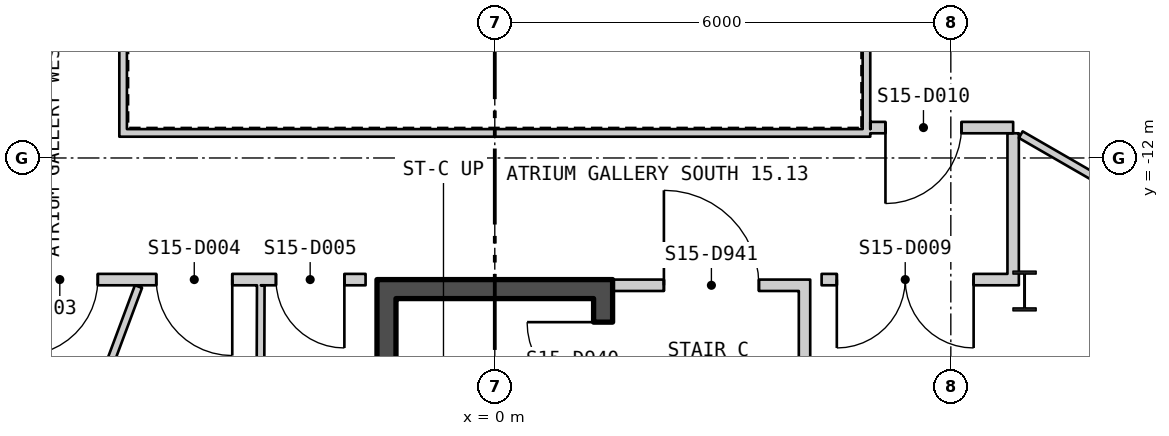
"""IFC4 building model, lengths in metres.
Left out: names, types, materials, properties, quantities, classifications, styles, units other than length and angle.
Written with IfcOpenShell. Run it as: python <this file> out.ifc"""

import sys

from ifc_helpers import new_model, si_unit, direction, frame, frame_2d, origin, origin_2d, place, context, subcontext, project, spatial, polyline, rectangle, i_section, outline, extrude, element, fill, save


model = new_model("IFC4")
c1 = context("Model", 3, precision=1e-05, world=origin(), true_north=direction((0.0, 1.0)))
c2 = subcontext(c1, "Body", "Model", "MODEL_VIEW")
j1 = project(units=[si_unit("LENGTHUNIT", "METRE"), si_unit("PLANEANGLEUNIT", "RADIAN")], contexts=[c1])
p1 = place(None, origin())
s1 = spatial("IfcSite", under=j1, at=p1, CompositionType="ELEMENT")
p2 = place(p1, origin())
s2 = spatial("IfcBuilding", under=s1, at=p2, CompositionType="ELEMENT")
p3 = place(p2, frame((0.0, 0.0, 204.3)))
s3 = spatial("IfcBuildingStorey", under=s2, at=p3, CompositionType="ELEMENT", Elevation=204.3)
p4 = place(p3, frame((6.97, -13.75, 0.0), z_axis=(0.0, 0.0, 1.0), x_axis=(1.0, 0.0, 0.0)))
e1 = element("IfcColumn", 1, at=p4, inside=s3, PredefinedType="COLUMN", context=c2, shape_type="SweptSolid", body=[
    extrude(i_section(OverallWidth=0.306, OverallDepth=0.524, WebThickness=0.021, FlangeThickness=0.04, at=origin_2d()), origin(), (0.0, 0.0, 1.0), 3.9),
])
p5 = place(p3, frame((-26.385, 13.887, -0.18), z_axis=(0.0, 0.0, 1.0), x_axis=(0.499999764979, -0.866025539474, 0.0)))
e2 = element("IfcWall", 2, at=p5, inside=s3, PredefinedType="SOLIDWALL", context=c2, shape_type="SweptSolid", body=[
    extrude(outline(polyline([(-0.13, -0.225), (45.87, -0.225), (45.61, 0.225), (0.13, 0.225), (-0.13, -0.225)])), origin(), (0.0, 0.0, 1.0), 3.68),
])
p6 = place(p5, frame((1.424, 0.0, 1.08)))
e3 = element("IfcOpeningElement", 3, at=p6, cuts=e2, PredefinedType="OPENING", context=c2, shape_type="SweptSolid", body=[
    extrude(rectangle(XDim=2.4, YDim=2.0, at=frame_2d((1.2, 1.0))), frame((0.0, 0.235, 0.0), z_axis=(0.0, -1.0, 0.0), x_axis=(1.0, 0.0, 0.0)), (0.0, 0.0, 1.0), 0.47),
])
p7 = place(p5, frame((5.893, 0.0, 1.08)))
e4 = element("IfcOpeningElement", 4, at=p7, cuts=e2, PredefinedType="OPENING", context=c2, shape_type="SweptSolid", body=[
    extrude(rectangle(XDim=2.4, YDim=2.0, at=frame_2d((1.2, 1.0))), frame((0.0, 0.235, 0.0), z_axis=(0.0, -1.0, 0.0), x_axis=(1.0, 0.0, 0.0)), (0.0, 0.0, 1.0), 0.47),
])
p8 = place(p5, frame((10.401, 0.0, 1.08)))
e5 = element("IfcOpeningElement", 5, at=p8, cuts=e2, PredefinedType="OPENING", context=c2, shape_type="SweptSolid", body=[
    extrude(rectangle(XDim=2.4, YDim=2.0, at=frame_2d((1.2, 1.0))), frame((0.0, 0.235, 0.0), z_axis=(0.0, -1.0, 0.0), x_axis=(1.0, 0.0, 0.0)), (0.0, 0.0, 1.0), 0.47),
])
p9 = place(p5, frame((14.909, 0.0, 1.08)))
e6 = element("IfcOpeningElement", 6, at=p9, cuts=e2, PredefinedType="OPENING", context=c2, shape_type="SweptSolid", body=[
    extrude(rectangle(XDim=2.4, YDim=2.0, at=frame_2d((1.2, 1.0))), frame((0.0, 0.235, 0.0), z_axis=(0.0, -1.0, 0.0), x_axis=(1.0, 0.0, 0.0)), (0.0, 0.0, 1.0), 0.47),
])
p10 = place(p5, frame((19.416, 0.0, 1.08)))
e7 = element("IfcOpeningElement", 7, at=p10, cuts=e2, PredefinedType="OPENING", context=c2, shape_type="SweptSolid", body=[
    extrude(rectangle(XDim=2.4, YDim=2.0, at=frame_2d((1.2, 1.0))), frame((0.0, 0.235, 0.0), z_axis=(0.0, -1.0, 0.0), x_axis=(1.0, 0.0, 0.0)), (0.0, 0.0, 1.0), 0.47),
])
p11 = place(p5, frame((23.924, 0.0, 1.08)))
e8 = element("IfcOpeningElement", 8, at=p11, cuts=e2, PredefinedType="OPENING", context=c2, shape_type="SweptSolid", body=[
    extrude(rectangle(XDim=2.4, YDim=2.0, at=frame_2d((1.2, 1.0))), frame((0.0, 0.235, 0.0), z_axis=(0.0, -1.0, 0.0), x_axis=(1.0, 0.0, 0.0)), (0.0, 0.0, 1.0), 0.47),
])
p12 = place(p5, frame((28.431, 0.0, 1.08)))
e9 = element("IfcOpeningElement", 9, at=p12, cuts=e2, PredefinedType="OPENING", context=c2, shape_type="SweptSolid", body=[
    extrude(rectangle(XDim=2.4, YDim=2.0, at=frame_2d((1.2, 1.0))), frame((0.0, 0.235, 0.0), z_axis=(0.0, -1.0, 0.0), x_axis=(1.0, 0.0, 0.0)), (0.0, 0.0, 1.0), 0.47),
])
p13 = place(p5, frame((32.939, 0.0, 1.08)))
e10 = element("IfcOpeningElement", 10, at=p13, cuts=e2, PredefinedType="OPENING", context=c2, shape_type="SweptSolid", body=[
    extrude(rectangle(XDim=2.4, YDim=2.0, at=frame_2d((1.2, 1.0))), frame((0.0, 0.235, 0.0), z_axis=(0.0, -1.0, 0.0), x_axis=(1.0, 0.0, 0.0)), (0.0, 0.0, 1.0), 0.47),
])
p14 = place(p5, frame((41.916, 0.0, 1.08)))
e11 = element("IfcOpeningElement", 11, at=p14, cuts=e2, PredefinedType="OPENING", context=c2, shape_type="SweptSolid", body=[
    extrude(rectangle(XDim=2.4, YDim=2.0, at=frame_2d((1.2, 1.0))), frame((0.0, 0.235, 0.0), z_axis=(0.0, -1.0, 0.0), x_axis=(1.0, 0.0, 0.0)), (0.0, 0.0, 1.0), 0.47),
])
p15 = place(p3, frame((3.515, -25.726, -0.18), z_axis=(0.0, 0.0, 1.0), x_axis=(0.499999764979, 0.866025539474, 0.0)))
e12 = element("IfcWall", 12, at=p15, inside=s3, PredefinedType="SOLIDWALL", context=c2, shape_type="SweptSolid", body=[
    extrude(outline(polyline([(-0.13, -0.225), (45.87, -0.225), (45.61, 0.225), (0.13, 0.225), (-0.13, -0.225)])), origin(), (0.0, 0.0, 1.0), 3.68),
])
p16 = place(p15, frame((1.424, 0.0, 1.08)))
e13 = element("IfcOpeningElement", 13, at=p16, cuts=e12, PredefinedType="OPENING", context=c2, shape_type="SweptSolid", body=[
    extrude(rectangle(XDim=2.4, YDim=2.0, at=frame_2d((1.2, 1.0))), frame((0.0, 0.235, 0.0), z_axis=(0.0, -1.0, 0.0), x_axis=(1.0, 0.0, 0.0)), (0.0, 0.0, 1.0), 0.47),
])
p17 = place(p15, frame((5.893, 0.0, 1.08)))
e14 = element("IfcOpeningElement", 14, at=p17, cuts=e12, PredefinedType="OPENING", context=c2, shape_type="SweptSolid", body=[
    extrude(rectangle(XDim=2.4, YDim=2.0, at=frame_2d((1.2, 1.0))), frame((0.0, 0.235, 0.0), z_axis=(0.0, -1.0, 0.0), x_axis=(1.0, 0.0, 0.0)), (0.0, 0.0, 1.0), 0.47),
])
p18 = place(p15, frame((10.401, 0.0, 1.08)))
e15 = element("IfcOpeningElement", 15, at=p18, cuts=e12, PredefinedType="OPENING", context=c2, shape_type="SweptSolid", body=[
    extrude(rectangle(XDim=2.4, YDim=2.0, at=frame_2d((1.2, 1.0))), frame((0.0, 0.235, 0.0), z_axis=(0.0, -1.0, 0.0), x_axis=(1.0, 0.0, 0.0)), (0.0, 0.0, 1.0), 0.47),
])
p19 = place(p15, frame((14.909, 0.0, 1.08)))
e16 = element("IfcOpeningElement", 16, at=p19, cuts=e12, PredefinedType="OPENING", context=c2, shape_type="SweptSolid", body=[
    extrude(rectangle(XDim=2.4, YDim=2.0, at=frame_2d((1.2, 1.0))), frame((0.0, 0.235, 0.0), z_axis=(0.0, -1.0, 0.0), x_axis=(1.0, 0.0, 0.0)), (0.0, 0.0, 1.0), 0.47),
])
p20 = place(p15, frame((19.416, 0.0, 1.08)))
e17 = element("IfcOpeningElement", 17, at=p20, cuts=e12, PredefinedType="OPENING", context=c2, shape_type="SweptSolid", body=[
    extrude(rectangle(XDim=2.4, YDim=2.0, at=frame_2d((1.2, 1.0))), frame((0.0, 0.235, 0.0), z_axis=(0.0, -1.0, 0.0), x_axis=(1.0, 0.0, 0.0)), (0.0, 0.0, 1.0), 0.47),
])
p21 = place(p15, frame((23.924, 0.0, 1.08)))
e18 = element("IfcOpeningElement", 18, at=p21, cuts=e12, PredefinedType="OPENING", context=c2, shape_type="SweptSolid", body=[
    extrude(rectangle(XDim=2.4, YDim=2.0, at=frame_2d((1.2, 1.0))), frame((0.0, 0.235, 0.0), z_axis=(0.0, -1.0, 0.0), x_axis=(1.0, 0.0, 0.0)), (0.0, 0.0, 1.0), 0.47),
])
p22 = place(p15, frame((28.431, 0.0, 1.08)))
e19 = element("IfcOpeningElement", 19, at=p22, cuts=e12, PredefinedType="OPENING", context=c2, shape_type="SweptSolid", body=[
    extrude(rectangle(XDim=2.4, YDim=2.0, at=frame_2d((1.2, 1.0))), frame((0.0, 0.235, 0.0), z_axis=(0.0, -1.0, 0.0), x_axis=(1.0, 0.0, 0.0)), (0.0, 0.0, 1.0), 0.47),
])
p23 = place(p15, frame((32.939, 0.0, 1.08)))
e20 = element("IfcOpeningElement", 20, at=p23, cuts=e12, PredefinedType="OPENING", context=c2, shape_type="SweptSolid", body=[
    extrude(rectangle(XDim=2.4, YDim=2.0, at=frame_2d((1.2, 1.0))), frame((0.0, 0.235, 0.0), z_axis=(0.0, -1.0, 0.0), x_axis=(1.0, 0.0, 0.0)), (0.0, 0.0, 1.0), 0.47),
])
p24 = place(p15, frame((37.447, 0.0, 1.08)))
e21 = element("IfcOpeningElement", 21, at=p24, cuts=e12, PredefinedType="OPENING", context=c2, shape_type="SweptSolid", body=[
    extrude(rectangle(XDim=2.4, YDim=2.0, at=frame_2d((1.2, 1.0))), frame((0.0, 0.235, 0.0), z_axis=(0.0, -1.0, 0.0), x_axis=(1.0, 0.0, 0.0)), (0.0, 0.0, 1.0), 0.47),
])
p25 = place(p15, frame((41.916, 0.0, 1.08)))
e22 = element("IfcOpeningElement", 22, at=p25, cuts=e12, PredefinedType="OPENING", context=c2, shape_type="SweptSolid", body=[
    extrude(rectangle(XDim=2.4, YDim=2.0, at=frame_2d((1.2, 1.0))), frame((0.0, 0.235, 0.0), z_axis=(0.0, -1.0, 0.0), x_axis=(1.0, 0.0, 0.0)), (0.0, 0.0, 1.0), 0.47),
])
p26 = place(p3, frame((-4.94, -11.67, 0.0), z_axis=(0.0, 0.0, 1.0), x_axis=(1.0, 0.0, 0.0)))
e23 = element("IfcWall", 23, at=p26, inside=s3, PredefinedType="PARTITIONING", context=c2, shape_type="SweptSolid", body=[
    extrude(rectangle(XDim=9.88, YDim=0.1, at=frame_2d((4.94, 0.0))), origin(), (0.0, 0.0, 1.0), 3.7),
])
for number, where, z_axis, x_axis in (
    (24, (4.89, -11.62, 0.0), (0.0, 0.0, 1.0), (0.0, 1.0, 0.0)),
    (25, (-4.89, -3.58, 0.0), (0.0, 0.0, 1.0), (0.0, -1.0, 0.0)),
):
    element("IfcWall", number, at=place(p3, frame(where, z_axis=z_axis, x_axis=x_axis)), inside=s3, PredefinedType="PARTITIONING", context=c2, shape_type="SweptSolid", body=[
        extrude(rectangle(XDim=8.04, YDim=0.1, at=frame_2d((4.02, 0.0))), origin(), (0.0, 0.0, 1.0), 3.7),
    ])
p27 = place(p3, frame((-1.425, -21.05, 0.0), z_axis=(0.0, 0.0, 1.0), x_axis=(0.0, 1.0, 0.0)))
e26 = element("IfcWall", 26, at=p27, inside=s3, PredefinedType="SHEAR", context=c2, shape_type="SweptSolid", body=[
    extrude(rectangle(XDim=7.2, YDim=0.25, at=frame_2d((3.6, 0.0))), origin(), (0.0, 0.0, 1.0), 3.7),
])
p28 = place(p3, frame((1.425, -21.05, 0.0), z_axis=(0.0, 0.0, 1.0), x_axis=(0.0, 1.0, 0.0)))
e27 = element("IfcWall", 27, at=p28, inside=s3, PredefinedType="SHEAR", context=c2, shape_type="SweptSolid", body=[
    extrude(rectangle(XDim=7.2, YDim=0.25, at=frame_2d((3.6, 0.0))), origin(), (0.0, 0.0, 1.0), 3.7),
])
p29 = place(p28, frame((5.89, 0.0, 0.0)))
e28 = element("IfcOpeningElement", 28, at=p29, cuts=e27, PredefinedType="OPENING", context=c2, shape_type="SweptSolid", body=[
    extrude(rectangle(XDim=1.0, YDim=2.1, at=frame_2d((0.5, 1.05))), frame((0.0, 0.135, 0.0), z_axis=(0.0, -1.0, 0.0), x_axis=(1.0, 0.0, 0.0)), (0.0, 0.0, 1.0), 0.27),
])
p30 = place(p3, frame((-1.55, -13.725, 0.0), z_axis=(0.0, 0.0, 1.0), x_axis=(1.0, 0.0, 0.0)))
e29 = element("IfcWall", 29, at=p30, inside=s3, PredefinedType="SHEAR", context=c2, shape_type="SweptSolid", body=[
    extrude(rectangle(XDim=3.1, YDim=0.25, at=frame_2d((1.55, 0.0))), origin(), (0.0, 0.0, 1.0), 3.7),
])
p31 = place(p3, frame((4.075, -16.15, 0.0), z_axis=(0.0, 0.0, 1.0), x_axis=(0.0, 1.0, 0.0)))
e30 = element("IfcWall", 30, at=p31, inside=s3, PredefinedType="PARTITIONING", context=c2, shape_type="SweptSolid", body=[
    extrude(rectangle(XDim=2.4, YDim=0.15, at=frame_2d((1.2, 0.0))), origin(), (0.0, 0.0, 1.0), 3.7),
])
p32 = place(p3, frame((1.55, -13.675, 0.0), z_axis=(0.0, 0.0, 1.0), x_axis=(1.0, 0.0, 0.0)))
e31 = element("IfcWall", 31, at=p32, inside=s3, PredefinedType="PARTITIONING", context=c2, shape_type="SweptSolid", body=[
    extrude(rectangle(XDim=2.6, YDim=0.15, at=frame_2d((1.3, 0.0))), origin(), (0.0, 0.0, 1.0), 2.91),
])
p33 = place(p32, frame((0.675, 0.0, 0.0)))
e32 = element("IfcOpeningElement", 32, at=p33, cuts=e31, PredefinedType="OPENING", context=c2, shape_type="SweptSolid", body=[
    extrude(rectangle(XDim=1.25, YDim=2.1, at=frame_2d((0.625, 1.05))), frame((0.0, 0.085, 0.0), z_axis=(0.0, -1.0, 0.0), x_axis=(1.0, 0.0, 0.0)), (0.0, 0.0, 1.0), 0.17),
])
p34 = place(p3, frame((-6.852, -19.495, 0.0), z_axis=(0.0, 0.0, 1.0), x_axis=(0.349406475185, 0.936971245609, 0.0)))
e33 = element("IfcWall", 33, at=p34, inside=s3, PredefinedType="PARTITIONING", context=c2, shape_type="SweptSolid", body=[
    extrude(rectangle(XDim=6.193, YDim=0.1, at=frame_2d((3.097, 0.0))), origin(), (0.0, 0.0, 1.0), 3.7),
])
p35 = place(p3, frame((-6.745, -13.6, 0.0), z_axis=(0.0, 0.0, 1.0), x_axis=(1.0, 0.0, 0.0)))
e34 = element("IfcWall", 34, at=p35, inside=s3, PredefinedType="PARTITIONING", context=c2, shape_type="SweptSolid", body=[
    extrude(rectangle(XDim=5.045, YDim=0.15, at=frame_2d((2.522, 0.0))), origin(), (0.0, 0.0, 1.0), 2.91),
])
p36 = place(p35, frame((0.522, 0.0, 0.0)))
e35 = element("IfcOpeningElement", 35, at=p36, cuts=e34, PredefinedType="OPENING", context=c2, shape_type="SweptSolid", body=[
    extrude(rectangle(XDim=1.0, YDim=2.1, at=frame_2d((0.5, 1.05))), frame((0.0, 0.085, 0.0), z_axis=(0.0, -1.0, 0.0), x_axis=(1.0, 0.0, 0.0)), (0.0, 0.0, 1.0), 0.17),
])
p37 = place(p35, frame((2.291, 0.0, 0.0)))
e36 = element("IfcOpeningElement", 36, at=p37, cuts=e34, PredefinedType="OPENING", context=c2, shape_type="SweptSolid", body=[
    extrude(rectangle(XDim=1.0, YDim=2.1, at=frame_2d((0.5, 1.05))), frame((0.0, 0.085, 0.0), z_axis=(0.0, -1.0, 0.0), x_axis=(1.0, 0.0, 0.0)), (0.0, 0.0, 1.0), 0.17),
])
p38 = place(p35, frame((3.866, 0.0, 0.0)))
e37 = element("IfcOpeningElement", 37, at=p38, cuts=e34, PredefinedType="OPENING", context=c2, shape_type="SweptSolid", body=[
    extrude(rectangle(XDim=0.9, YDim=2.1, at=frame_2d((0.45, 1.05))), frame((0.0, 0.085, 0.0), z_axis=(0.0, -1.0, 0.0), x_axis=(1.0, 0.0, 0.0)), (0.0, 0.0, 1.0), 0.17),
])
p39 = place(p3, frame((-3.1, -19.948, 0.0), z_axis=(0.0, 0.0, 1.0), x_axis=(0.003347661777, 0.999994396565, 0.0)))
e38 = element("IfcWall", 38, at=p39, inside=s3, PredefinedType="PARTITIONING", context=c2, shape_type="SweptSolid", body=[
    extrude(rectangle(XDim=6.273, YDim=0.1, at=frame_2d((3.136, 0.0))), origin(), (0.0, 0.0, 1.0), 3.01),
])
p40 = place(p3, frame((4.3, -13.6, 0.0), z_axis=(0.0, 0.0, 1.0), x_axis=(1.0, 0.0, 0.0)))
e39 = element("IfcWall", 39, at=p40, inside=s3, PredefinedType="PARTITIONING", context=c2, shape_type="SweptSolid", body=[
    extrude(rectangle(XDim=2.595, YDim=0.15, at=frame_2d((1.298, 0.0))), origin(), (0.0, 0.0, 1.0), 2.91),
])
p41 = place(p40, frame((0.2, 0.0, 0.0)))
e40 = element("IfcOpeningElement", 40, at=p41, cuts=e39, PredefinedType="OPENING", context=c2, shape_type="SweptSolid", body=[
    extrude(rectangle(XDim=1.8, YDim=2.1, at=frame_2d((0.9, 1.05))), frame((0.0, 0.085, 0.0), z_axis=(0.0, -1.0, 0.0), x_axis=(1.0, 0.0, 0.0)), (0.0, 0.0, 1.0), 0.17),
])
p42 = place(p3, frame((4.94, -11.6, 0.0), z_axis=(0.0, 0.0, 1.0), x_axis=(1.0, 0.0, 0.0)))
e41 = element("IfcWall", 41, at=p42, inside=s3, PredefinedType="PARTITIONING", context=c2, shape_type="SweptSolid", body=[
    extrude(rectangle(XDim=1.88, YDim=0.15, at=frame_2d((0.94, 0.0))), origin(), (0.0, 0.0, 1.0), 3.7),
])
p43 = place(p42, frame((0.2, 0.0, 0.0)))
e42 = element("IfcOpeningElement", 42, at=p43, cuts=e41, PredefinedType="OPENING", context=c2, shape_type="SweptSolid", body=[
    extrude(rectangle(XDim=1.0, YDim=2.1, at=frame_2d((0.5, 1.05))), frame((0.0, 0.085, 0.0), z_axis=(0.0, -1.0, 0.0), x_axis=(1.0, 0.0, 0.0)), (0.0, 0.0, 1.0), 0.17),
])
p44 = place(p3, frame((6.82, -13.525, 0.0), z_axis=(0.0, 0.0, 1.0), x_axis=(0.0, 1.0, 0.0)))
e43 = element("IfcWall", 43, at=p44, inside=s3, PredefinedType="PARTITIONING", context=c2, shape_type="SweptSolid", body=[
    extrude(rectangle(XDim=1.85, YDim=0.15, at=frame_2d((0.925, 0.0))), origin(), (0.0, 0.0, 1.0), 3.11),
])
p45 = place(p3, frame((6.92, -11.693, 0.0), z_axis=(0.0, 0.0, 1.0), x_axis=(0.866259181428, -0.499594866458, 0.0)))
e44 = element("IfcWall", 44, at=p45, inside=s3, PredefinedType="PARTITIONING", context=c2, shape_type="SweptSolid", body=[
    extrude(rectangle(XDim=3.393, YDim=0.1, at=frame_2d((1.696, 0.0))), origin(), (0.0, 0.0, 1.0), 3.7),
])
p46 = place(p29, origin())
e45 = element("IfcDoor", 45, at=p46, inside=s3, OperationType="SINGLE_SWING_LEFT", PredefinedType="DOOR", context=c2, shape_type="SweptSolid", body=[
    extrude(rectangle(XDim=1.0, YDim=2.1, at=frame_2d((0.5, 1.05))), frame((0.0, 0.025, 0.0), z_axis=(0.0, -1.0, 0.0), x_axis=(1.0, 0.0, 0.0)), (0.0, 0.0, 1.0), 0.05),
])
fill(e28, e45)
p47 = place(p33, origin())
e46 = element("IfcDoor", 46, at=p47, inside=s3, OperationType="SINGLE_SWING_RIGHT", PredefinedType="DOOR", context=c2, shape_type="SweptSolid", body=[
    extrude(rectangle(XDim=1.25, YDim=2.1, at=frame_2d((0.625, 1.05))), frame((0.0, 0.025, 0.0), z_axis=(0.0, -1.0, 0.0), x_axis=(1.0, 0.0, 0.0)), (0.0, 0.0, 1.0), 0.05),
])
fill(e32, e46)
p48 = place(p36, origin())
e47 = element("IfcDoor", 47, at=p48, inside=s3, OperationType="SINGLE_SWING_LEFT", PredefinedType="DOOR", context=c2, shape_type="SweptSolid", body=[
    extrude(rectangle(XDim=1.0, YDim=2.1, at=frame_2d((0.5, 1.05))), frame((0.0, 0.025, 0.0), z_axis=(0.0, -1.0, 0.0), x_axis=(1.0, 0.0, 0.0)), (0.0, 0.0, 1.0), 0.05),
])
fill(e35, e47)
p49 = place(p37, origin())
e48 = element("IfcDoor", 48, at=p49, inside=s3, OperationType="SINGLE_SWING_RIGHT", PredefinedType="DOOR", context=c2, shape_type="SweptSolid", body=[
    extrude(rectangle(XDim=1.0, YDim=2.1, at=frame_2d((0.5, 1.05))), frame((0.0, 0.025, 0.0), z_axis=(0.0, -1.0, 0.0), x_axis=(1.0, 0.0, 0.0)), (0.0, 0.0, 1.0), 0.05),
])
fill(e36, e48)
p50 = place(p38, origin())
e49 = element("IfcDoor", 49, at=p50, inside=s3, OperationType="SINGLE_SWING_RIGHT", PredefinedType="DOOR", context=c2, shape_type="SweptSolid", body=[
    extrude(rectangle(XDim=0.9, YDim=2.1, at=frame_2d((0.45, 1.05))), frame((0.0, 0.025, 0.0), z_axis=(0.0, -1.0, 0.0), x_axis=(1.0, 0.0, 0.0)), (0.0, 0.0, 1.0), 0.05),
])
fill(e37, e49)
p51 = place(p41, origin())
e50 = element("IfcDoor", 50, at=p51, inside=s3, OperationType="DOUBLE_DOOR_SINGLE_SWING", PredefinedType="DOOR", context=c2, shape_type="SweptSolid", body=[
    extrude(rectangle(XDim=1.8, YDim=2.1, at=frame_2d((0.9, 1.05))), frame((0.0, 0.025, 0.0), z_axis=(0.0, -1.0, 0.0), x_axis=(1.0, 0.0, 0.0)), (0.0, 0.0, 1.0), 0.05),
])
fill(e40, e50)
p52 = place(p43, origin())
e51 = element("IfcDoor", 51, at=p52, inside=s3, OperationType="SINGLE_SWING_LEFT", PredefinedType="DOOR", context=c2, shape_type="SweptSolid", body=[
    extrude(rectangle(XDim=1.0, YDim=2.1, at=frame_2d((0.5, 1.05))), frame((0.0, 0.025, 0.0), z_axis=(0.0, -1.0, 0.0), x_axis=(1.0, 0.0, 0.0)), (0.0, 0.0, 1.0), 0.05),
])
fill(e42, e51)
save(model, sys.argv[1])
